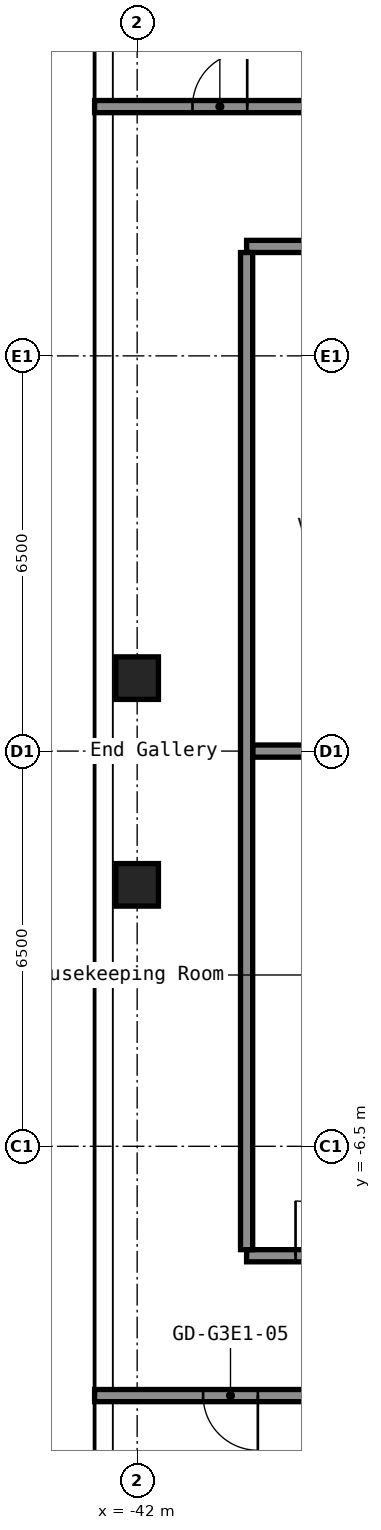
"""IFC4 building model, lengths in metres.
Left out: names, types, materials, properties, quantities, classifications, styles, units other than length and angle.
Written with IfcOpenShell. Run it as: python <this file> out.ifc"""

import sys

from ifc_helpers import new_model, si_unit, direction, frame, frame_2d, origin, origin_2d, place, context, subcontext, project, spatial, rectangle, hollow_rectangle, extrude, element, fill, save


model = new_model("IFC4")
c1 = context("Model", 3, precision=1e-05, world=origin(), true_north=direction((0.0, 1.0)))
c2 = subcontext(c1, "Body", "Model", "MODEL_VIEW")
j1 = project(units=[si_unit("LENGTHUNIT", "METRE"), si_unit("PLANEANGLEUNIT", "RADIAN")], contexts=[c1])
p1 = place(None, origin())
s1 = spatial("IfcSite", under=j1, at=p1, CompositionType="ELEMENT")
p2 = place(p1, origin())
s2 = spatial("IfcBuilding", under=s1, at=p2, CompositionType="ELEMENT")
p3 = place(p2, frame((0.0, 0.0, 159.8)))
s3 = spatial("IfcBuildingStorey", under=s2, at=p3, CompositionType="ELEMENT", Elevation=159.8)
for number, where, z_axis, x_axis in (
    (1, (-42.0, -2.2, 0.0), (0.0, 0.0, 1.0), (1.0, 0.0, 0.0)),
    (2, (-42.0, 1.2, 0.0), (0.0, 0.0, 1.0), (1.0, 0.0, 0.0)),
):
    element("IfcColumn", number, at=place(p3, frame(where, z_axis=z_axis, x_axis=x_axis)), inside=s3, PredefinedType="COLUMN", context=c2, shape_type="SweptSolid", body=[
        extrude(hollow_rectangle(XDim=0.7, YDim=0.7, WallThickness=0.028, at=origin_2d()), origin(), (0.0, 0.0, 1.0), 2.75),
    ])
p4 = place(p3, frame((-42.7, -10.6, 0.0), z_axis=(0.0, 0.0, 1.0), x_axis=(1.0, 0.0, 0.0)))
e3 = element("IfcWall", 3, at=p4, inside=s3, PredefinedType="PARTITIONING", context=c2, shape_type="SweptSolid", body=[
    extrude(rectangle(XDim=25.9, YDim=0.2, at=frame_2d((12.95, 0.0))), origin(), (0.0, 0.0, 1.0), 2.75),
])
p5 = place(p4, frame((1.785, 0.0, 0.0)))
e4 = element("IfcOpeningElement", 4, at=p5, cuts=e3, PredefinedType="OPENING", context=c2, shape_type="SweptSolid", body=[
    extrude(rectangle(XDim=0.9, YDim=2.1, at=frame_2d((0.45, 1.05))), frame((0.0, 0.11, 0.0), z_axis=(0.0, -1.0, 0.0), x_axis=(1.0, 0.0, 0.0)), (0.0, 0.0, 1.0), 0.22),
])
p6 = place(p4, frame((6.185, 0.0, 0.0)))
e5 = element("IfcOpeningElement", 5, at=p6, cuts=e3, PredefinedType="OPENING", context=c2, shape_type="SweptSolid", body=[
    extrude(rectangle(XDim=0.9, YDim=2.1, at=frame_2d((0.45, 1.05))), frame((0.0, 0.11, 0.0), z_axis=(0.0, -1.0, 0.0), x_axis=(1.0, 0.0, 0.0)), (0.0, 0.0, 1.0), 0.22),
])
p7 = place(p4, frame((10.92, 0.0, 0.0)))
e6 = element("IfcOpeningElement", 6, at=p7, cuts=e3, PredefinedType="OPENING", context=c2, shape_type="SweptSolid", body=[
    extrude(rectangle(XDim=0.9, YDim=2.1, at=frame_2d((0.45, 1.05))), frame((0.0, 0.11, 0.0), z_axis=(0.0, -1.0, 0.0), x_axis=(1.0, 0.0, 0.0)), (0.0, 0.0, 1.0), 0.22),
])
p8 = place(p4, frame((15.12, 0.0, 0.0)))
e7 = element("IfcOpeningElement", 7, at=p8, cuts=e3, PredefinedType="OPENING", context=c2, shape_type="SweptSolid", body=[
    extrude(rectangle(XDim=0.9, YDim=2.1, at=frame_2d((0.45, 1.05))), frame((0.0, 0.11, 0.0), z_axis=(0.0, -1.0, 0.0), x_axis=(1.0, 0.0, 0.0)), (0.0, 0.0, 1.0), 0.22),
])
p9 = place(p4, frame((21.2, 0.0, 0.0)))
e8 = element("IfcOpeningElement", 8, at=p9, cuts=e3, PredefinedType="OPENING", context=c2, shape_type="SweptSolid", body=[
    extrude(rectangle(XDim=1.0, YDim=2.1, at=frame_2d((0.5, 1.05))), frame((0.0, 0.11, 0.0), z_axis=(0.0, -1.0, 0.0), x_axis=(1.0, 0.0, 0.0)), (0.0, 0.0, 1.0), 0.22),
])
p10 = place(p3, frame((-40.2, -8.3, 0.0), z_axis=(0.0, 0.0, 1.0), x_axis=(1.0, 0.0, 0.0)))
e9 = element("IfcWall", 9, at=p10, inside=s3, PredefinedType="PARTITIONING", context=c2, shape_type="SweptSolid", body=[
    extrude(rectangle(XDim=6.6, YDim=0.2, at=frame_2d((3.3, 0.0))), origin(), (0.0, 0.0, 1.0), 2.75),
])
p11 = place(p10, frame((0.805, 0.0, 0.0)))
e10 = element("IfcOpeningElement", 10, at=p11, cuts=e9, PredefinedType="OPENING", context=c2, shape_type="SweptSolid", body=[
    extrude(rectangle(XDim=0.9, YDim=2.1, at=frame_2d((0.45, 1.05))), frame((0.0, 0.11, 0.0), z_axis=(0.0, -1.0, 0.0), x_axis=(1.0, 0.0, 0.0)), (0.0, 0.0, 1.0), 0.22),
])
p12 = place(p10, frame((4.105, 0.0, 0.0)))
e11 = element("IfcOpeningElement", 11, at=p12, cuts=e9, PredefinedType="OPENING", context=c2, shape_type="SweptSolid", body=[
    extrude(rectangle(XDim=0.9, YDim=2.1, at=frame_2d((0.45, 1.05))), frame((0.0, 0.11, 0.0), z_axis=(0.0, -1.0, 0.0), x_axis=(1.0, 0.0, 0.0)), (0.0, 0.0, 1.0), 0.22),
])
p13 = place(p3, frame((-40.1, 0.0, 0.0), z_axis=(0.0, 0.0, 1.0), x_axis=(1.0, 0.0, 0.0)))
e12 = element("IfcWall", 12, at=p13, inside=s3, PredefinedType="PARTITIONING", context=c2, shape_type="SweptSolid", body=[
    extrude(rectangle(XDim=6.5, YDim=0.2, at=frame_2d((3.25, 0.0))), origin(), (0.0, 0.0, 1.0), 2.75),
])
p14 = place(p3, frame((-40.2, 8.3, 0.0), z_axis=(0.0, 0.0, 1.0), x_axis=(1.0, 0.0, 0.0)))
e13 = element("IfcWall", 13, at=p14, inside=s3, PredefinedType="PARTITIONING", context=c2, shape_type="SweptSolid", body=[
    extrude(rectangle(XDim=6.6, YDim=0.2, at=frame_2d((3.3, 0.0))), origin(), (0.0, 0.0, 1.0), 2.75),
])
p15 = place(p14, frame((1.53, 0.0, 0.0)))
e14 = element("IfcOpeningElement", 14, at=p15, cuts=e13, PredefinedType="OPENING", context=c2, shape_type="SweptSolid", body=[
    extrude(rectangle(XDim=0.9, YDim=2.1, at=frame_2d((0.45, 1.05))), frame((0.0, 0.11, 0.0), z_axis=(0.0, -1.0, 0.0), x_axis=(1.0, 0.0, 0.0)), (0.0, 0.0, 1.0), 0.22),
])
p16 = place(p14, frame((4.83, 0.0, 0.0)))
e15 = element("IfcOpeningElement", 15, at=p16, cuts=e13, PredefinedType="OPENING", context=c2, shape_type="SweptSolid", body=[
    extrude(rectangle(XDim=0.9, YDim=2.1, at=frame_2d((0.45, 1.05))), frame((0.0, 0.11, 0.0), z_axis=(0.0, -1.0, 0.0), x_axis=(1.0, 0.0, 0.0)), (0.0, 0.0, 1.0), 0.22),
])
p17 = place(p3, frame((-42.7, 10.6, 0.0), z_axis=(0.0, 0.0, 1.0), x_axis=(1.0, 0.0, 0.0)))
e16 = element("IfcWall", 16, at=p17, inside=s3, PredefinedType="PARTITIONING", context=c2, shape_type="SweptSolid", body=[
    extrude(rectangle(XDim=25.9, YDim=0.2, at=frame_2d((12.95, 0.0))), origin(), (0.0, 0.0, 1.0), 2.75),
])
p18 = place(p17, frame((1.61, 0.0, 0.0)))
e17 = element("IfcOpeningElement", 17, at=p18, cuts=e16, PredefinedType="OPENING", context=c2, shape_type="SweptSolid", body=[
    extrude(rectangle(XDim=0.9, YDim=2.1, at=frame_2d((0.45, 1.05))), frame((0.0, 0.11, 0.0), z_axis=(0.0, -1.0, 0.0), x_axis=(1.0, 0.0, 0.0)), (0.0, 0.0, 1.0), 0.22),
])
p19 = place(p17, frame((6.01, 0.0, 0.0)))
e18 = element("IfcOpeningElement", 18, at=p19, cuts=e16, PredefinedType="OPENING", context=c2, shape_type="SweptSolid", body=[
    extrude(rectangle(XDim=0.9, YDim=2.1, at=frame_2d((0.45, 1.05))), frame((0.0, 0.11, 0.0), z_axis=(0.0, -1.0, 0.0), x_axis=(1.0, 0.0, 0.0)), (0.0, 0.0, 1.0), 0.22),
])
p20 = place(p17, frame((12.8, 0.0, 0.0)))
e19 = element("IfcOpeningElement", 19, at=p20, cuts=e16, PredefinedType="OPENING", context=c2, shape_type="SweptSolid", body=[
    extrude(rectangle(XDim=1.0, YDim=2.1, at=frame_2d((0.5, 1.05))), frame((0.0, 0.11, 0.0), z_axis=(0.0, -1.0, 0.0), x_axis=(1.0, 0.0, 0.0)), (0.0, 0.0, 1.0), 0.22),
])
p21 = place(p17, frame((19.4, 0.0, 0.0)))
e20 = element("IfcOpeningElement", 20, at=p21, cuts=e16, PredefinedType="OPENING", context=c2, shape_type="SweptSolid", body=[
    extrude(rectangle(XDim=0.9, YDim=2.1, at=frame_2d((0.45, 1.05))), frame((0.0, 0.11, 0.0), z_axis=(0.0, -1.0, 0.0), x_axis=(1.0, 0.0, 0.0)), (0.0, 0.0, 1.0), 0.22),
])
p22 = place(p17, frame((23.6, 0.0, 0.0)))
e21 = element("IfcOpeningElement", 21, at=p22, cuts=e16, PredefinedType="OPENING", context=c2, shape_type="SweptSolid", body=[
    extrude(rectangle(XDim=0.9, YDim=2.1, at=frame_2d((0.45, 1.05))), frame((0.0, 0.11, 0.0), z_axis=(0.0, -1.0, 0.0), x_axis=(1.0, 0.0, 0.0)), (0.0, 0.0, 1.0), 0.22),
])
p23 = place(p3, frame((-40.2, -8.2, 0.0), z_axis=(0.0, 0.0, 1.0), x_axis=(0.0, 1.0, 0.0)))
e22 = element("IfcWall", 22, at=p23, inside=s3, PredefinedType="PARTITIONING", context=c2, shape_type="SweptSolid", body=[
    extrude(rectangle(XDim=16.4, YDim=0.2, at=frame_2d((8.2, 0.0))), origin(), (0.0, 0.0, 1.0), 2.75),
])
p24 = place(p5, origin())
e23 = element("IfcDoor", 23, at=p24, inside=s3, OperationType="SINGLE_SWING_RIGHT", PredefinedType="DOOR", context=c2, shape_type="SweptSolid", body=[
    extrude(rectangle(XDim=0.9, YDim=2.1, at=frame_2d((0.45, 1.05))), frame((0.0, 0.025, 0.0), z_axis=(0.0, -1.0, 0.0), x_axis=(1.0, 0.0, 0.0)), (0.0, 0.0, 1.0), 0.05),
])
fill(e4, e23)
p25 = place(p11, origin())
e24 = element("IfcDoor", 24, at=p25, inside=s3, OperationType="SINGLE_SWING_RIGHT", PredefinedType="DOOR", context=c2, shape_type="SweptSolid", body=[
    extrude(rectangle(XDim=0.9, YDim=2.1, at=frame_2d((0.45, 1.05))), frame((0.0, 0.025, 0.0), z_axis=(0.0, -1.0, 0.0), x_axis=(1.0, 0.0, 0.0)), (0.0, 0.0, 1.0), 0.05),
])
fill(e10, e24)
p26 = place(p18, origin())
e25 = element("IfcDoor", 25, at=p26, inside=s3, OperationType="SINGLE_SWING_LEFT", PredefinedType="DOOR", context=c2, shape_type="SweptSolid", body=[
    extrude(rectangle(XDim=0.9, YDim=2.1, at=frame_2d((0.45, 1.05))), frame((0.0, 0.025, 0.0), z_axis=(0.0, -1.0, 0.0), x_axis=(1.0, 0.0, 0.0)), (0.0, 0.0, 1.0), 0.05),
])
fill(e17, e25)
save(model, sys.argv[1])
